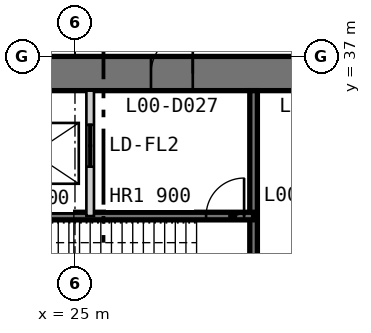
"""IFC4 building model, lengths in metres.
Left out: names, types, materials, properties, quantities, classifications, styles, units other than length and angle.
Written with IfcOpenShell. Run it as: python <this file> out.ifc"""

import sys

from ifc_helpers import new_model, si_unit, direction, frame, frame_2d, origin, place, context, subcontext, project, spatial, polyline, rectangle, outline, extrude, element, fill, save


model = new_model("IFC4")
c1 = context("Model", 3, precision=1e-05, world=origin(), true_north=direction((0.0, 1.0)))
c2 = subcontext(c1, "Body", "Model", "MODEL_VIEW")
j1 = project(units=[si_unit("LENGTHUNIT", "METRE"), si_unit("PLANEANGLEUNIT", "RADIAN")], contexts=[c1])
p1 = place(None, origin())
s1 = spatial("IfcSite", under=j1, at=p1, CompositionType="ELEMENT")
p2 = place(p1, origin())
s2 = spatial("IfcBuilding", under=s1, at=p2, CompositionType="ELEMENT")
p3 = place(p2, origin())
s3 = spatial("IfcBuildingStorey", under=s2, at=p3, CompositionType="ELEMENT", Elevation=0.0)
p4 = place(p3, frame((37.0, 36.55, 0.0), z_axis=(0.0, 0.0, 1.0), x_axis=(-1.0, 0.0, 0.0)))
e1 = element("IfcWall", 1, at=p4, inside=s3, PredefinedType="SHEAR", context=c2, shape_type="SweptSolid", body=[
    extrude(outline(polyline([(0.0, -0.45), (24.0, -0.45), (23.1, 0.45), (0.9, 0.45), (0.0, -0.45)])), origin(), (0.0, 0.0, 1.0), 7.0),
])
p5 = place(p4, frame((4.9, 0.0, 0.0)))
e2 = element("IfcOpeningElement", 2, at=p5, cuts=e1, PredefinedType="OPENING", context=c2, shape_type="SweptSolid", body=[
    extrude(rectangle(XDim=1.0, YDim=2.2, at=frame_2d((0.5, 1.1))), frame((0.0, 0.46, 0.0), z_axis=(0.0, -1.0, 0.0), x_axis=(1.0, 0.0, 0.0)), (0.0, 0.0, 1.0), 0.92),
])
p6 = place(p4, frame((8.9, 0.0, 0.0)))
e3 = element("IfcOpeningElement", 3, at=p6, cuts=e1, PredefinedType="OPENING", context=c2, shape_type="SweptSolid", body=[
    extrude(rectangle(XDim=1.1, YDim=2.2, at=frame_2d((0.55, 1.1))), frame((0.0, 0.46, 0.0), z_axis=(0.0, -1.0, 0.0), x_axis=(1.0, 0.0, 0.0)), (0.0, 0.0, 1.0), 0.92),
])
p7 = place(p4, frame((15.05, 0.0, 0.0)))
e4 = element("IfcOpeningElement", 4, at=p7, cuts=e1, PredefinedType="OPENING", context=c2, shape_type="SweptSolid", body=[
    extrude(rectangle(XDim=0.9, YDim=2.2, at=frame_2d((0.45, 1.1))), frame((0.0, 0.46, 0.0), z_axis=(0.0, -1.0, 0.0), x_axis=(1.0, 0.0, 0.0)), (0.0, 0.0, 1.0), 0.92),
])
p8 = place(p4, frame((17.9, 0.0, 0.0)))
e5 = element("IfcOpeningElement", 5, at=p8, cuts=e1, PredefinedType="OPENING", context=c2, shape_type="SweptSolid", body=[
    extrude(rectangle(XDim=1.0, YDim=2.2, at=frame_2d((0.5, 1.1))), frame((0.0, 0.46, 0.0), z_axis=(0.0, -1.0, 0.0), x_axis=(1.0, 0.0, 0.0)), (0.0, 0.0, 1.0), 0.92),
])
p9 = place(p4, frame((21.4, 0.0, 0.0)))
e6 = element("IfcOpeningElement", 6, at=p9, cuts=e1, PredefinedType="OPENING", context=c2, shape_type="SweptSolid", body=[
    extrude(rectangle(XDim=1.0, YDim=2.2, at=frame_2d((0.5, 1.1))), frame((0.0, 0.46, 0.0), z_axis=(0.0, -1.0, 0.0), x_axis=(1.0, 0.0, 0.0)), (0.0, 0.0, 1.0), 0.92),
])
p10 = place(p3, frame((29.7, 36.1, 0.0), z_axis=(0.0, 0.0, 1.0), x_axis=(0.0, -1.0, 0.0)))
e7 = element("IfcWall", 7, at=p10, inside=s3, PredefinedType="SOLIDWALL", context=c2, shape_type="SweptSolid", body=[
    extrude(rectangle(XDim=16.1, YDim=0.2, at=frame_2d((8.05, 0.0))), origin(), (0.0, 0.0, 1.0), 6.8),
])
p11 = place(p10, frame((7.217, 0.0, 0.0)))
e8 = element("IfcOpeningElement", 8, at=p11, cuts=e7, PredefinedType="OPENING", context=c2, shape_type="SweptSolid", body=[
    extrude(rectangle(XDim=1.1, YDim=2.2, at=frame_2d((0.55, 1.1))), frame((0.0, 0.11, 0.0), z_axis=(0.0, -1.0, 0.0), x_axis=(1.0, 0.0, 0.0)), (0.0, 0.0, 1.0), 0.22),
])
p12 = place(p10, frame((10.55, 0.0, 0.0)))
e9 = element("IfcOpeningElement", 9, at=p12, cuts=e7, PredefinedType="OPENING", context=c2, shape_type="SweptSolid", body=[
    extrude(rectangle(XDim=1.1, YDim=2.2, at=frame_2d((0.55, 1.1))), frame((0.0, 0.11, 0.0), z_axis=(0.0, -1.0, 0.0), x_axis=(1.0, 0.0, 0.0)), (0.0, 0.0, 1.0), 0.22),
])
p13 = place(p10, frame((13.883, 0.0, 0.0)))
e10 = element("IfcOpeningElement", 10, at=p13, cuts=e7, PredefinedType="OPENING", context=c2, shape_type="SweptSolid", body=[
    extrude(rectangle(XDim=1.1, YDim=2.2, at=frame_2d((0.55, 1.1))), frame((0.0, 0.11, 0.0), z_axis=(0.0, -1.0, 0.0), x_axis=(1.0, 0.0, 0.0)), (0.0, 0.0, 1.0), 0.22),
])
p14 = place(p3, frame((29.7, 32.8, 0.0), z_axis=(0.0, 0.0, 1.0), x_axis=(-1.0, 0.0, 0.0)))
e11 = element("IfcWall", 11, at=p14, inside=s3, PredefinedType="SOLIDWALL", context=c2, shape_type="SweptSolid", body=[
    extrude(rectangle(XDim=9.4, YDim=0.2, at=frame_2d((4.7, 0.0))), origin(), (0.0, 0.0, 1.0), 6.8),
])
p15 = place(p14, frame((0.25, 0.0, 0.0)))
e12 = element("IfcOpeningElement", 12, at=p15, cuts=e11, PredefinedType="OPENING", context=c2, shape_type="SweptSolid", body=[
    extrude(rectangle(XDim=1.0, YDim=2.2, at=frame_2d((0.5, 1.1))), frame((0.0, 0.11, 0.0), z_axis=(0.0, -1.0, 0.0), x_axis=(1.0, 0.0, 0.0)), (0.0, 0.0, 1.0), 0.22),
])
p16 = place(p3, frame((25.4, 36.1, 0.0), z_axis=(0.0, 0.0, 1.0), x_axis=(0.0, -1.0, 0.0)))
e13 = element("IfcWall", 13, at=p16, inside=s3, PredefinedType="PARTITIONING", context=c2, shape_type="SweptSolid", body=[
    extrude(rectangle(XDim=3.3, YDim=0.2, at=frame_2d((1.65, 0.0))), origin(), (0.0, 0.0, 1.0), 6.8),
])
p17 = place(p16, frame((0.9, 0.0, 0.0)))
e14 = element("IfcOpeningElement", 14, at=p17, cuts=e13, PredefinedType="OPENING", context=c2, shape_type="SweptSolid", body=[
    extrude(rectangle(XDim=1.1, YDim=2.2, at=frame_2d((0.55, 1.1))), frame((0.0, 0.11, 0.0), z_axis=(0.0, -1.0, 0.0), x_axis=(1.0, 0.0, 0.0)), (0.0, 0.0, 1.0), 0.22),
])
p18 = place(p6, frame((1.1, 0.0, 0.0), z_axis=(0.0, 0.0, 1.0), x_axis=(-1.0, 0.0, 0.0)))
e15 = element("IfcDoor", 15, at=p18, inside=s3, OperationType="SINGLE_SWING_RIGHT", PredefinedType="DOOR", context=c2, shape_type="SweptSolid", body=[
    extrude(rectangle(XDim=1.1, YDim=2.2, at=frame_2d((0.55, 1.1))), frame((0.0, 0.025, 0.0), z_axis=(0.0, -1.0, 0.0), x_axis=(1.0, 0.0, 0.0)), (0.0, 0.0, 1.0), 0.05),
    extrude(outline(polyline([(0.0, 0.0), (0.04, 0.0), (0.04, 2.16), (1.06, 2.16), (1.06, 0.0), (1.1, 0.0), (1.1, 2.2), (0.0, 2.2), (0.0, 0.0)])), frame((0.0, 0.3, 0.0), z_axis=(0.0, -1.0, 0.0), x_axis=(1.0, 0.0, 0.0)), (0.0, 0.0, 1.0), 0.6),
])
fill(e3, e15)
p19 = place(p15, frame((1.0, 0.0, 0.0), z_axis=(0.0, 0.0, 1.0), x_axis=(-1.0, 0.0, 0.0)))
e16 = element("IfcDoor", 16, at=p19, inside=s3, OperationType="SINGLE_SWING_RIGHT", PredefinedType="DOOR", context=c2, shape_type="SweptSolid", body=[
    extrude(rectangle(XDim=1.0, YDim=2.2, at=frame_2d((0.5, 1.1))), frame((0.0, 0.025, 0.0), z_axis=(0.0, -1.0, 0.0), x_axis=(1.0, 0.0, 0.0)), (0.0, 0.0, 1.0), 0.05),
])
fill(e12, e16)
p20 = place(p17, origin())
e17 = element("IfcDoor", 17, at=p20, inside=s3, OperationType="DOUBLE_DOOR_SLIDING", PredefinedType="DOOR", context=c2, shape_type="SweptSolid", body=[
    extrude(rectangle(XDim=1.1, YDim=2.2, at=frame_2d((0.55, 1.1))), frame((0.0, 0.025, 0.0), z_axis=(0.0, -1.0, 0.0), x_axis=(1.0, 0.0, 0.0)), (0.0, 0.0, 1.0), 0.05),
])
fill(e14, e17)
save(model, sys.argv[1])
